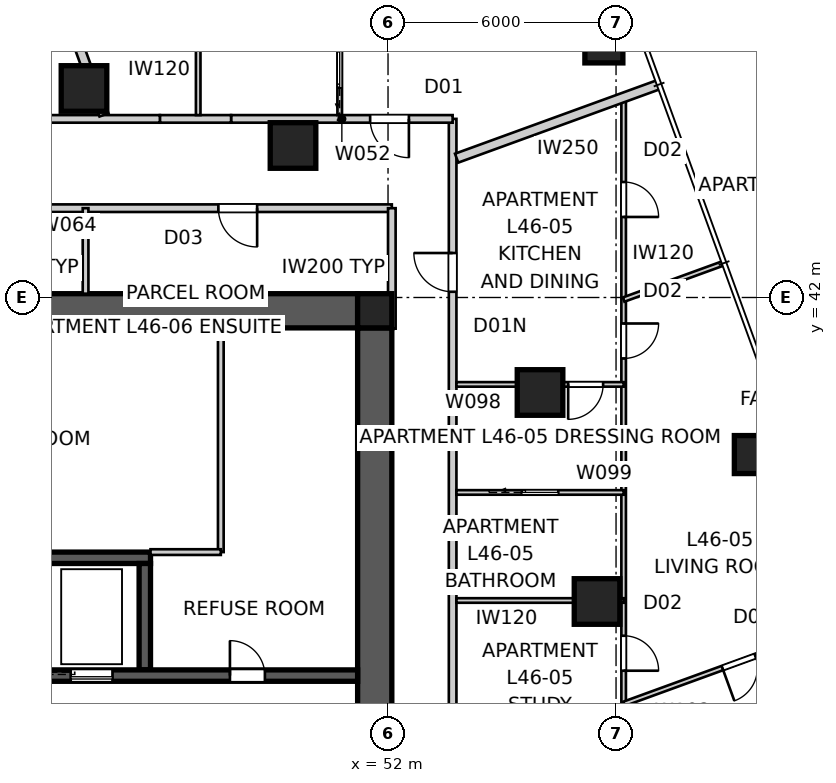
"""IFC4 building model, lengths in metres.
Left out: names, types, materials, properties, quantities, classifications, styles, units other than length and angle.
Written with IfcOpenShell. Run it as: python <this file> out.ifc"""

import sys

from ifc_helpers import new_model, si_unit, direction, frame, frame_2d, origin, origin_2d, place, context, subcontext, project, spatial, polyline, rectangle, outline, extrude, element, fill, save


model = new_model("IFC4")
c1 = context("Model", 3, precision=1e-05, world=origin(), true_north=direction((0.0, 1.0)))
c2 = subcontext(c1, "Body", "Model", "MODEL_VIEW")
j1 = project(units=[si_unit("LENGTHUNIT", "METRE"), si_unit("PLANEANGLEUNIT", "RADIAN")], contexts=[c1])
p1 = place(None, origin())
s1 = spatial("IfcSite", under=j1, at=p1, CompositionType="ELEMENT")
p2 = place(p1, origin())
s2 = spatial("IfcBuilding", under=s1, at=p2, CompositionType="ELEMENT")
p3 = place(p2, frame((0.0, 0.0, 167.6)))
s3 = spatial("IfcBuildingStorey", under=s2, at=p3, CompositionType="ELEMENT", Elevation=167.6)
p4 = place(p3, frame((28.8, 41.65, 0.0), z_axis=(0.0, 0.0, 1.0), x_axis=(1.0, 0.0, 0.0)))
e1 = element("IfcWall", 1, at=p4, inside=s3, PredefinedType="SHEAR", context=c2, shape_type="SweptSolid", body=[
    extrude(outline(polyline([(0.0, -0.45), (22.4, -0.45), (22.4, -0.025), (22.85, -0.025), (22.85, 0.025), (22.4, 0.025), (22.4, 0.45), (0.0, 0.45), (0.0, 0.025), (-0.45, 0.025), (-0.45, -0.025), (0.0, -0.025), (0.0, -0.45)])), origin(), (0.0, 0.0, 1.0), 3.4),
])
p5 = place(p3, frame((51.65, 18.8, 0.0), z_axis=(0.0, 0.0, 1.0), x_axis=(0.0, 1.0, 0.0)))
e2 = element("IfcWall", 2, at=p5, inside=s3, PredefinedType="SHEAR", context=c2, shape_type="SweptSolid", body=[
    extrude(outline(polyline([(0.0, -0.45), (22.4, -0.45), (22.4, -0.025), (22.85, -0.025), (22.85, 0.025), (22.4, 0.025), (22.4, 0.45), (0.0, 0.45), (0.0, 0.025), (-0.45, 0.025), (-0.45, -0.025), (0.0, -0.025), (0.0, -0.45)])), origin(), (0.0, 0.0, 1.0), 3.4),
])
p6 = place(p5, frame((11.14, 0.0, 0.0)))
e3 = element("IfcOpeningElement", 3, at=p6, cuts=e2, PredefinedType="OPENING", context=c2, shape_type="SweptSolid", body=[
    extrude(rectangle(XDim=1.02, YDim=2.4, at=frame_2d((0.51, 1.2))), frame((0.0, 0.46, 0.0), z_axis=(0.0, -1.0, 0.0), x_axis=(1.0, 0.0, 0.0)), (0.0, 0.0, 1.0), 0.92),
])
p7 = place(p3, frame((28.8, 32.05, 0.0), z_axis=(0.0, 0.0, 1.0), x_axis=(1.0, 0.0, 0.0)))
e4 = element("IfcWall", 4, at=p7, inside=s3, PredefinedType="SHEAR", context=c2, shape_type="SweptSolid", body=[
    extrude(rectangle(XDim=22.4, YDim=0.3, at=frame_2d((11.2, 0.0))), origin(), (0.0, 0.0, 1.0), 3.4),
])
p8 = place(p7, frame((19.04, 0.0, 0.0)))
e5 = element("IfcOpeningElement", 5, at=p8, cuts=e4, PredefinedType="OPENING", context=c2, shape_type="SweptSolid", body=[
    extrude(rectangle(XDim=0.92, YDim=2.1, at=frame_2d((0.46, 1.05))), frame((0.0, 0.16, 0.0), z_axis=(0.0, -1.0, 0.0), x_axis=(1.0, 0.0, 0.0)), (0.0, 0.0, 1.0), 0.32),
])
p9 = place(p7, frame((1.265, 0.0, 0.0)))
e6 = element("IfcOpeningElement", 6, at=p9, cuts=e4, PredefinedType="OPENING", context=c2, shape_type="SweptSolid", body=[
    extrude(rectangle(XDim=1.02, YDim=2.1, at=frame_2d((0.51, 1.05))), frame((0.0, 0.16, 0.0), z_axis=(0.0, -1.0, 0.0), x_axis=(1.0, 0.0, 0.0)), (0.0, 0.0, 1.0), 0.32),
])
p10 = place(p7, frame((4.015, 0.0, 0.0)))
e7 = element("IfcOpeningElement", 7, at=p10, cuts=e4, PredefinedType="OPENING", context=c2, shape_type="SweptSolid", body=[
    extrude(rectangle(XDim=0.92, YDim=2.1, at=frame_2d((0.46, 1.05))), frame((0.0, 0.16, 0.0), z_axis=(0.0, -1.0, 0.0), x_axis=(1.0, 0.0, 0.0)), (0.0, 0.0, 1.0), 0.32),
])
p11 = place(p7, frame((6.115, 0.0, 0.0)))
e8 = element("IfcOpeningElement", 8, at=p11, cuts=e4, PredefinedType="OPENING", context=c2, shape_type="SweptSolid", body=[
    extrude(rectangle(XDim=0.92, YDim=2.1, at=frame_2d((0.46, 1.05))), frame((0.0, 0.16, 0.0), z_axis=(0.0, -1.0, 0.0), x_axis=(1.0, 0.0, 0.0)), (0.0, 0.0, 1.0), 0.32),
])
p12 = place(p7, frame((9.79, 0.0, 0.0)))
e9 = element("IfcOpeningElement", 9, at=p12, cuts=e4, PredefinedType="OPENING", context=c2, shape_type="SweptSolid", body=[
    extrude(rectangle(XDim=0.92, YDim=2.1, at=frame_2d((0.46, 1.05))), frame((0.0, 0.16, 0.0), z_axis=(0.0, -1.0, 0.0), x_axis=(1.0, 0.0, 0.0)), (0.0, 0.0, 1.0), 0.32),
])
p13 = place(p7, frame((14.85, 0.0, 0.0)))
e10 = element("IfcOpeningElement", 10, at=p13, cuts=e4, PredefinedType="OPENING", context=c2, shape_type="SweptSolid", body=[
    extrude(rectangle(XDim=1.1, YDim=2.1, at=frame_2d((0.55, 1.05))), frame((0.0, 0.16, 0.0), z_axis=(0.0, -1.0, 0.0), x_axis=(1.0, 0.0, 0.0)), (0.0, 0.0, 1.0), 0.32),
])
p14 = place(p3, frame((34.25, 35.15, 0.0), z_axis=(0.0, 0.0, 1.0), x_axis=(1.0, 0.0, 0.0)))
e11 = element("IfcWall", 11, at=p14, inside=s3, PredefinedType="SHEAR", context=c2, shape_type="SweptSolid", body=[
    extrude(rectangle(XDim=11.5, YDim=0.3, at=frame_2d((5.75, 0.0))), origin(), (0.0, 0.0, 1.0), 3.4),
])
p15 = place(p3, frame((45.6, 32.2, 0.0), z_axis=(0.0, 0.0, 1.0), x_axis=(0.0, 1.0, 0.0)))
e12 = element("IfcWall", 12, at=p15, inside=s3, PredefinedType="SHEAR", context=c2, shape_type="SweptSolid", body=[
    extrude(rectangle(XDim=2.8, YDim=0.3, at=frame_2d((1.4, 0.0))), origin(), (0.0, 0.0, 1.0), 3.4),
])
p16 = place(p3, frame((51.65, 41.65, 0.0), z_axis=(0.0, 0.0, 1.0), x_axis=(1.0, 0.0, 0.0)))
e13 = element("IfcColumn", 13, at=p16, inside=s3, PredefinedType="COLUMN", context=c2, shape_type="SweptSolid", body=[
    extrude(rectangle(XDim=0.9, YDim=0.9, at=origin_2d()), origin(), (0.0, 0.0, 1.0), 3.4),
])
for number, where, z_axis, x_axis in (
    (14, (61.613, 37.866, 0.0), (0.0, 0.0, 1.0), (1.0, 0.0, 0.0)),
    (15, (57.68, 48.673, 0.0), (0.0, 0.0, 1.0), (1.0, 0.0, 0.0)),
):
    element("IfcColumn", number, at=place(p3, frame(where, z_axis=z_axis, x_axis=x_axis)), inside=s3, PredefinedType="COLUMN", context=c2, shape_type="SweptSolid", body=[
        extrude(rectangle(XDim=1.0, YDim=1.0, at=origin_2d()), origin(), (0.0, 0.0, 1.0), 3.2),
    ])
for number, where, z_axis, x_axis in (
    (16, (57.5, 34.0, 0.0), (0.0, 0.0, 1.0), (1.0, 0.0, 0.0)),
    (17, (56.0, 39.5, 0.0), (0.0, 0.0, 1.0), (1.0, 0.0, 0.0)),
    (18, (49.5, 46.0, 0.0), (0.0, 0.0, 1.0), (1.0, 0.0, 0.0)),
    (19, (44.0, 47.5, 0.0), (0.0, 0.0, 1.0), (1.0, 0.0, 0.0)),
):
    element("IfcColumn", number, at=place(p3, frame(where, z_axis=z_axis, x_axis=x_axis)), inside=s3, PredefinedType="COLUMN", context=c2, shape_type="SweptSolid", body=[
        extrude(rectangle(XDim=1.2, YDim=1.2, at=origin_2d()), origin(), (0.0, 0.0, 1.0), 3.4),
    ])
p17 = place(p3, frame((53.7, 12.9, 0.0), z_axis=(0.0, 0.0, 1.0), x_axis=(0.0, 1.0, 0.0)))
e20 = element("IfcWall", 20, at=p17, inside=s3, PredefinedType="PARTITIONING", context=c2, shape_type="SweptSolid", body=[
    extrude(rectangle(XDim=33.8, YDim=0.2, at=frame_2d((16.9, 0.0))), origin(), (0.0, 0.0, 1.0), 3.2),
])
p18 = place(p17, frame((29.25, 0.0, 0.0)))
e21 = element("IfcOpeningElement", 21, at=p18, cuts=e20, PredefinedType="OPENING", context=c2, shape_type="SweptSolid", body=[
    extrude(rectangle(XDim=1.02, YDim=2.0, at=frame_2d((0.51, 1.0))), frame((0.0, 0.11, 0.0), z_axis=(0.0, -1.0, 0.0), x_axis=(1.0, 0.0, 0.0)), (0.0, 0.0, 1.0), 0.22),
])
p19 = place(p17, frame((2.87, 0.0, 0.0)))
e22 = element("IfcOpeningElement", 22, at=p19, cuts=e20, PredefinedType="OPENING", context=c2, shape_type="SweptSolid", body=[
    extrude(rectangle(XDim=1.02, YDim=2.34, at=frame_2d((0.51, 1.17))), frame((0.0, 0.11, 0.0), z_axis=(0.0, -1.0, 0.0), x_axis=(1.0, 0.0, 0.0)), (0.0, 0.0, 1.0), 0.22),
])
p20 = place(p3, frame((53.7, 46.7, 0.0), z_axis=(0.0, 0.0, 1.0), x_axis=(-1.0, 0.0, 0.0)))
e23 = element("IfcWall", 23, at=p20, inside=s3, PredefinedType="PARTITIONING", context=c2, shape_type="SweptSolid", body=[
    extrude(rectangle(XDim=5.83, YDim=0.2, at=frame_2d((2.915, 0.0))), origin(), (0.0, 0.0, 1.0), 3.2),
])
p21 = place(p20, frame((1.151, 0.0, 0.0)))
e24 = element("IfcOpeningElement", 24, at=p21, cuts=e23, PredefinedType="OPENING", context=c2, shape_type="SweptSolid", body=[
    extrude(rectangle(XDim=1.02, YDim=2.34, at=frame_2d((0.51, 1.17))), frame((0.0, 0.11, 0.0), z_axis=(0.0, -1.0, 0.0), x_axis=(1.0, 0.0, 0.0)), (0.0, 0.0, 1.0), 0.22),
])
p22 = place(p3, frame((47.87, 46.7, 0.0), z_axis=(0.0, 0.0, 1.0), x_axis=(-1.0, 0.0, 0.0)))
e25 = element("IfcWall", 25, at=p22, inside=s3, PredefinedType="PARTITIONING", context=c2, shape_type="SweptSolid", body=[
    extrude(rectangle(XDim=1.874, YDim=0.2, at=frame_2d((0.937, 0.0))), origin(), (0.0, 0.0, 1.0), 2.2),
])
p23 = place(p3, frame((45.997, 46.7, 0.0), z_axis=(0.0, 0.0, 1.0), x_axis=(-1.0, 0.0, 0.0)))
e26 = element("IfcWall", 26, at=p23, inside=s3, PredefinedType="PARTITIONING", context=c2, shape_type="SweptSolid", body=[
    extrude(rectangle(XDim=11.993, YDim=0.2, at=frame_2d((5.997, 0.0))), origin(), (0.0, 0.0, 1.0), 3.2),
])
p24 = place(p3, frame((59.132, 47.605, 0.0), z_axis=(0.0, 0.0, 1.0), x_axis=(-0.939690274876, -0.342026588591, 0.0)))
e27 = element("IfcWall", 27, at=p24, inside=s3, PredefinedType="PARTITIONING", context=c2, shape_type="SweptSolid", body=[
    extrude(rectangle(XDim=5.669, YDim=0.25, at=frame_2d((2.834, 0.0))), origin(), (0.0, 0.0, 1.0), 3.2),
])
p25 = place(p3, frame((43.717, 49.026, 0.0), z_axis=(0.0, 0.0, 1.0), x_axis=(0.342049950026, -0.939681771499, 0.0)))
e28 = element("IfcWall", 28, at=p25, inside=s3, PredefinedType="PARTITIONING", context=c2, shape_type="SweptSolid", body=[
    extrude(rectangle(XDim=2.363, YDim=0.25, at=frame_2d((1.182, 0.0))), origin(), (0.0, 0.0, 1.0), 3.2),
])
p26 = place(p3, frame((47.6, 41.2, 0.0), z_axis=(0.0, 0.0, 1.0), x_axis=(0.0, -1.0, 0.0)))
e29 = element("IfcWall", 29, at=p26, inside=s3, PredefinedType="SOLIDWALL", context=c2, shape_type="SweptSolid", body=[
    extrude(rectangle(XDim=5.9, YDim=0.15, at=frame_2d((2.95, 0.0))), origin(), (0.0, 0.0, 1.0), 3.2),
])
p27 = place(p3, frame((47.6, 35.3, 0.0), z_axis=(0.0, 0.0, 1.0), x_axis=(-1.0, 0.0, 0.0)))
e30 = element("IfcWall", 30, at=p27, inside=s3, PredefinedType="SOLIDWALL", context=c2, shape_type="SweptSolid", body=[
    extrude(rectangle(XDim=1.85, YDim=0.15, at=frame_2d((0.925, 0.0))), origin(), (0.0, 0.0, 1.0), 3.2),
])
p28 = place(p3, frame((52.1, 44.35, 0.0), z_axis=(0.0, 0.0, 1.0), x_axis=(-1.0, 0.0, 0.0)))
e31 = element("IfcWall", 31, at=p28, inside=s3, PredefinedType="PARTITIONING", context=c2, shape_type="SweptSolid", body=[
    extrude(rectangle(XDim=24.2, YDim=0.2, at=frame_2d((12.1, 0.0))), origin(), (0.0, 0.0, 1.0), 3.2),
])
p29 = place(p28, frame((12.437, 0.0, 0.0)))
e32 = element("IfcOpeningElement", 32, at=p29, cuts=e31, PredefinedType="OPENING", context=c2, shape_type="SweptSolid", body=[
    extrude(rectangle(XDim=1.02, YDim=2.1, at=frame_2d((0.51, 1.05))), frame((0.0, 0.11, 0.0), z_axis=(0.0, -1.0, 0.0), x_axis=(1.0, 0.0, 0.0)), (0.0, 0.0, 1.0), 0.22),
])
p30 = place(p28, frame((3.544, 0.0, 0.0)))
e33 = element("IfcOpeningElement", 33, at=p30, cuts=e31, PredefinedType="OPENING", context=c2, shape_type="SweptSolid", body=[
    extrude(rectangle(XDim=1.02, YDim=2.1, at=frame_2d((0.51, 1.05))), frame((0.0, 0.11, 0.0), z_axis=(0.0, -1.0, 0.0), x_axis=(1.0, 0.0, 0.0)), (0.0, 0.0, 1.0), 0.22),
])
p31 = place(p28, frame((19.883, 0.0, 0.0)))
e34 = element("IfcOpeningElement", 34, at=p31, cuts=e31, PredefinedType="OPENING", context=c2, shape_type="SweptSolid", body=[
    extrude(rectangle(XDim=1.02, YDim=2.1, at=frame_2d((0.51, 1.05))), frame((0.0, 0.11, 0.0), z_axis=(0.0, -1.0, 0.0), x_axis=(1.0, 0.0, 0.0)), (0.0, 0.0, 1.0), 0.22),
])
p32 = place(p3, frame((52.1, 41.18, 0.0), z_axis=(0.0, 0.0, 1.0), x_axis=(0.0, 1.0, 0.0)))
e35 = element("IfcWall", 35, at=p32, inside=s3, PredefinedType="PARTITIONING", context=c2, shape_type="SweptSolid", body=[
    extrude(rectangle(XDim=3.17, YDim=0.2, at=frame_2d((1.585, 0.0))), origin(), (0.0, 0.0, 1.0), 3.2),
])
p33 = place(p3, frame((44.042, 42.1, 0.0), z_axis=(0.0, 0.0, 1.0), x_axis=(0.0, 1.0, 0.0)))
e36 = element("IfcWall", 36, at=p33, inside=s3, PredefinedType="SOLIDWALL", context=c2, shape_type="SweptSolid", body=[
    extrude(rectangle(XDim=2.25, YDim=0.15, at=frame_2d((1.125, 0.0))), origin(), (0.0, 0.0, 1.0), 3.2),
])
p34 = place(p3, frame((58.2, 47.266, 0.0), z_axis=(0.0, 0.0, 1.0), x_axis=(0.0, -1.0, 0.0)))
e37 = element("IfcWall", 37, at=p34, inside=s3, PredefinedType="PARTITIONING", context=c2, shape_type="SweptSolid", body=[
    extrude(rectangle(XDim=36.14, YDim=0.12, at=frame_2d((18.07, 0.0))), origin(), (0.0, 0.0, 1.0), 3.2),
])
p35 = place(p34, frame((2.227, 0.0, 0.0)))
e38 = element("IfcOpeningElement", 38, at=p35, cuts=e37, PredefinedType="OPENING", context=c2, shape_type="SweptSolid", body=[
    extrude(rectangle(XDim=0.92, YDim=2.34, at=frame_2d((0.46, 1.17))), frame((0.0, 0.07, 0.0), z_axis=(0.0, -1.0, 0.0), x_axis=(1.0, 0.0, 0.0)), (0.0, 0.0, 1.0), 0.14),
])
p36 = place(p34, frame((5.95, 0.0, 0.0)))
e39 = element("IfcOpeningElement", 39, at=p36, cuts=e37, PredefinedType="OPENING", context=c2, shape_type="SweptSolid", body=[
    extrude(rectangle(XDim=0.92, YDim=2.34, at=frame_2d((0.46, 1.17))), frame((0.0, 0.07, 0.0), z_axis=(0.0, -1.0, 0.0), x_axis=(1.0, 0.0, 0.0)), (0.0, 0.0, 1.0), 0.14),
])
p37 = place(p34, frame((29.769, 0.0, 0.0)))
e40 = element("IfcOpeningElement", 40, at=p37, cuts=e37, PredefinedType="OPENING", context=c2, shape_type="SweptSolid", body=[
    extrude(rectangle(XDim=0.92, YDim=2.34, at=frame_2d((0.46, 1.17))), frame((0.0, 0.07, 0.0), z_axis=(0.0, -1.0, 0.0), x_axis=(1.0, 0.0, 0.0)), (0.0, 0.0, 1.0), 0.14),
])
p38 = place(p34, frame((14.168, 0.0, 0.0)))
e41 = element("IfcOpeningElement", 41, at=p38, cuts=e37, PredefinedType="OPENING", context=c2, shape_type="SweptSolid", body=[
    extrude(rectangle(XDim=0.92, YDim=2.34, at=frame_2d((0.46, 1.17))), frame((0.0, 0.07, 0.0), z_axis=(0.0, -1.0, 0.0), x_axis=(1.0, 0.0, 0.0)), (0.0, 0.0, 1.0), 0.14),
])
p39 = place(p34, frame((33.434, 0.0, 0.0)))
e42 = element("IfcOpeningElement", 42, at=p39, cuts=e37, PredefinedType="OPENING", context=c2, shape_type="SweptSolid", body=[
    extrude(rectangle(XDim=0.92, YDim=2.34, at=frame_2d((0.46, 1.17))), frame((0.0, 0.07, 0.0), z_axis=(0.0, -1.0, 0.0), x_axis=(1.0, 0.0, 0.0)), (0.0, 0.0, 1.0), 0.14),
])
p40 = place(p3, frame((58.2, 39.713, 0.0), z_axis=(0.0, 0.0, 1.0), x_axis=(-1.0, 0.0, 0.0)))
e43 = element("IfcWall", 43, at=p40, inside=s3, PredefinedType="PARTITIONING", context=c2, shape_type="SweptSolid", body=[
    extrude(rectangle(XDim=4.4, YDim=0.12, at=frame_2d((2.2, 0.0))), origin(), (0.0, 0.0, 1.0), 3.2),
])
p41 = place(p40, frame((0.54, 0.0, 0.0)))
e44 = element("IfcOpeningElement", 44, at=p41, cuts=e43, PredefinedType="OPENING", context=c2, shape_type="SweptSolid", body=[
    extrude(rectangle(XDim=0.92, YDim=2.34, at=frame_2d((0.46, 1.17))), frame((0.0, 0.07, 0.0), z_axis=(0.0, -1.0, 0.0), x_axis=(1.0, 0.0, 0.0)), (0.0, 0.0, 1.0), 0.14),
])
p42 = place(p3, frame((53.8, 36.87, 0.0), z_axis=(0.0, 0.0, 1.0), x_axis=(1.0, 0.0, 0.0)))
e45 = element("IfcWall", 45, at=p42, inside=s3, PredefinedType="PARTITIONING", context=c2, shape_type="SweptSolid", body=[
    extrude(rectangle(XDim=4.4, YDim=0.12, at=frame_2d((2.2, 0.0))), origin(), (0.0, 0.0, 1.0), 3.2),
])
p43 = place(p42, frame((1.72, 0.0, 0.0)))
e46 = element("IfcOpeningElement", 46, at=p43, cuts=e45, PredefinedType="OPENING", context=c2, shape_type="SweptSolid", body=[
    extrude(rectangle(XDim=0.96, YDim=2.1, at=frame_2d((0.48, 1.05))), frame((0.0, 0.07, 0.0), z_axis=(0.0, -1.0, 0.0), x_axis=(1.0, 0.0, 0.0)), (0.0, 0.0, 1.0), 0.14),
])
p44 = place(p3, frame((58.2, 34.027, 0.0), z_axis=(0.0, 0.0, 1.0), x_axis=(-1.0, 0.0, 0.0)))
e47 = element("IfcWall", 47, at=p44, inside=s3, PredefinedType="PARTITIONING", context=c2, shape_type="SweptSolid", body=[
    extrude(rectangle(XDim=4.4, YDim=0.12, at=frame_2d((2.2, 0.0))), origin(), (0.0, 0.0, 1.0), 3.2),
])
p45 = place(p3, frame((64.225, 33.496, 0.0), z_axis=(0.0, 0.0, 1.0), x_axis=(-0.939697777766, -0.342005974306, 0.0)))
e48 = element("IfcWall", 48, at=p45, inside=s3, PredefinedType="PARTITIONING", context=c2, shape_type="SweptSolid", body=[
    extrude(rectangle(XDim=6.412, YDim=0.12, at=frame_2d((3.206, 0.0))), origin(), (0.0, 0.0, 1.0), 3.2),
])
p46 = place(p45, frame((2.726, 0.0, 0.0)))
e49 = element("IfcOpeningElement", 49, at=p46, cuts=e48, PredefinedType="OPENING", context=c2, shape_type="SweptSolid", body=[
    extrude(rectangle(XDim=0.92, YDim=2.34, at=frame_2d((0.46, 1.17))), frame((0.0, 0.07, 0.0), z_axis=(0.0, -1.0, 0.0), x_axis=(1.0, 0.0, 0.0)), (0.0, 0.0, 1.0), 0.14),
])
p47 = place(p3, frame((58.2, 41.945, 0.0), z_axis=(0.0, 0.0, 1.0), x_axis=(0.939680234176, 0.34205417334, 0.0)))
e50 = element("IfcWall", 50, at=p47, inside=s3, PredefinedType="PARTITIONING", context=c2, shape_type="SweptSolid", body=[
    extrude(rectangle(XDim=2.772, YDim=0.12, at=frame_2d((1.386, 0.0))), origin(), (0.0, 0.0, 1.0), 3.2),
])
p48 = place(p3, frame((50.729, 46.8, 0.0), z_axis=(0.0, 0.0, 1.0), x_axis=(0.0, 1.0, 0.0)))
e51 = element("IfcWall", 51, at=p48, inside=s3, PredefinedType="PARTITIONING", context=c2, shape_type="SweptSolid", body=[
    extrude(rectangle(XDim=2.4, YDim=0.12, at=frame_2d((1.2, 0.0))), origin(), (0.0, 0.0, 1.0), 3.2),
])
p49 = place(p48, frame((0.72, 0.0, 0.0)))
e52 = element("IfcOpeningElement", 52, at=p49, cuts=e51, PredefinedType="OPENING", context=c2, shape_type="SweptSolid", body=[
    extrude(rectangle(XDim=0.96, YDim=2.1, at=frame_2d((0.48, 1.05))), frame((0.0, 0.07, 0.0), z_axis=(0.0, -1.0, 0.0), x_axis=(1.0, 0.0, 0.0)), (0.0, 0.0, 1.0), 0.14),
])
p50 = place(p3, frame((47.005, 46.8, 0.0), z_axis=(0.0, 0.0, 1.0), x_axis=(0.0, 1.0, 0.0)))
e53 = element("IfcWall", 53, at=p50, inside=s3, PredefinedType="PARTITIONING", context=c2, shape_type="SweptSolid", body=[
    extrude(rectangle(XDim=2.4, YDim=0.12, at=frame_2d((1.2, 0.0))), origin(), (0.0, 0.0, 1.0), 3.2),
])
p51 = place(p8, origin())
e54 = element("IfcDoor", 54, at=p51, inside=s3, OperationType="SINGLE_SWING_LEFT", PredefinedType="DOOR", context=c2, shape_type="SweptSolid", body=[
    extrude(rectangle(XDim=0.92, YDim=2.1, at=frame_2d((0.46, 1.05))), frame((0.0, 0.025, 0.0), z_axis=(0.0, -1.0, 0.0), x_axis=(1.0, 0.0, 0.0)), (0.0, 0.0, 1.0), 0.05),
])
fill(e5, e54)
p52 = place(p30, origin())
e55 = element("IfcDoor", 55, at=p52, inside=s3, OperationType="SINGLE_SWING_LEFT", PredefinedType="DOOR", context=c2, shape_type="SweptSolid", body=[
    extrude(rectangle(XDim=1.02, YDim=2.1, at=frame_2d((0.51, 1.05))), frame((0.0, 0.025, 0.0), z_axis=(0.0, -1.0, 0.0), x_axis=(1.0, 0.0, 0.0)), (0.0, 0.0, 1.0), 0.05),
])
fill(e33, e55)
p53 = place(p18, origin())
e56 = element("IfcDoor", 56, at=p53, inside=s3, OperationType="SINGLE_SWING_RIGHT", PredefinedType="DOOR", context=c2, shape_type="SweptSolid", body=[
    extrude(rectangle(XDim=1.02, YDim=2.0, at=frame_2d((0.51, 1.0))), frame((0.0, 0.025, 0.0), z_axis=(0.0, -1.0, 0.0), x_axis=(1.0, 0.0, 0.0)), (0.0, 0.0, 1.0), 0.05),
])
fill(e21, e56)
p54 = place(p21, origin())
e57 = element("IfcDoor", 57, at=p54, inside=s3, OperationType="SINGLE_SWING_LEFT", PredefinedType="DOOR", context=c2, shape_type="SweptSolid", body=[
    extrude(rectangle(XDim=1.02, YDim=2.34, at=frame_2d((0.51, 1.17))), frame((0.0, 0.025, 0.0), z_axis=(0.0, -1.0, 0.0), x_axis=(1.0, 0.0, 0.0)), (0.0, 0.0, 1.0), 0.05),
])
fill(e24, e57)
p55 = place(p35, origin())
e58 = element("IfcDoor", 58, at=p55, inside=s3, OperationType="SINGLE_SWING_RIGHT", PredefinedType="DOOR", context=c2, shape_type="SweptSolid", body=[
    extrude(rectangle(XDim=0.92, YDim=2.34, at=frame_2d((0.46, 1.17))), frame((0.0, 0.025, 0.0), z_axis=(0.0, -1.0, 0.0), x_axis=(1.0, 0.0, 0.0)), (0.0, 0.0, 1.0), 0.05),
])
fill(e38, e58)
p56 = place(p41, origin())
e59 = element("IfcDoor", 59, at=p56, inside=s3, OperationType="SINGLE_SWING_RIGHT", PredefinedType="DOOR", context=c2, shape_type="SweptSolid", body=[
    extrude(rectangle(XDim=0.92, YDim=2.34, at=frame_2d((0.46, 1.17))), frame((0.0, 0.025, 0.0), z_axis=(0.0, -1.0, 0.0), x_axis=(1.0, 0.0, 0.0)), (0.0, 0.0, 1.0), 0.05),
])
fill(e44, e59)
p57 = place(p36, origin())
e60 = element("IfcDoor", 60, at=p57, inside=s3, OperationType="SINGLE_SWING_LEFT", PredefinedType="DOOR", context=c2, shape_type="SweptSolid", body=[
    extrude(rectangle(XDim=0.92, YDim=2.34, at=frame_2d((0.46, 1.17))), frame((0.0, 0.025, 0.0), z_axis=(0.0, -1.0, 0.0), x_axis=(1.0, 0.0, 0.0)), (0.0, 0.0, 1.0), 0.05),
])
fill(e39, e60)
p58 = place(p49, origin())
e61 = element("IfcDoor", 61, at=p58, inside=s3, OperationType="SLIDING_TO_LEFT", PredefinedType="DOOR", context=c2, shape_type="SweptSolid", body=[
    extrude(rectangle(XDim=0.96, YDim=2.1, at=frame_2d((0.48, 1.05))), frame((0.0, 0.025, 0.0), z_axis=(0.0, -1.0, 0.0), x_axis=(1.0, 0.0, 0.0)), (0.0, 0.0, 1.0), 0.05),
])
fill(e52, e61)
p59 = place(p43, origin())
e62 = element("IfcDoor", 62, at=p59, inside=s3, OperationType="SLIDING_TO_LEFT", PredefinedType="DOOR", context=c2, shape_type="SweptSolid", body=[
    extrude(rectangle(XDim=0.96, YDim=2.1, at=frame_2d((0.48, 1.05))), frame((0.0, 0.025, 0.0), z_axis=(0.0, -1.0, 0.0), x_axis=(1.0, 0.0, 0.0)), (0.0, 0.0, 1.0), 0.05),
])
fill(e46, e62)
p60 = place(p46, origin())
e63 = element("IfcDoor", 63, at=p60, inside=s3, OperationType="SINGLE_SWING_RIGHT", PredefinedType="DOOR", context=c2, shape_type="SweptSolid", body=[
    extrude(rectangle(XDim=0.92, YDim=2.34, at=frame_2d((0.46, 1.17))), frame((0.0, 0.025, 0.0), z_axis=(0.0, -1.0, 0.0), x_axis=(1.0, 0.0, 0.0)), (0.0, 0.0, 1.0), 0.05),
])
fill(e49, e63)
p61 = place(p38, origin())
e64 = element("IfcDoor", 64, at=p61, inside=s3, OperationType="SINGLE_SWING_RIGHT", PredefinedType="DOOR", context=c2, shape_type="SweptSolid", body=[
    extrude(rectangle(XDim=0.92, YDim=2.34, at=frame_2d((0.46, 1.17))), frame((0.0, 0.025, 0.0), z_axis=(0.0, -1.0, 0.0), x_axis=(1.0, 0.0, 0.0)), (0.0, 0.0, 1.0), 0.05),
])
fill(e41, e64)
p62 = place(p13, origin())
e65 = element("IfcDoor", 65, at=p62, inside=s3, OperationType="SLIDING_TO_LEFT", PredefinedType="DOOR", context=c2, shape_type="SweptSolid", body=[
    extrude(rectangle(XDim=1.1, YDim=2.1, at=frame_2d((0.55, 1.05))), frame((0.0, 0.025, 0.0), z_axis=(0.0, -1.0, 0.0), x_axis=(1.0, 0.0, 0.0)), (0.0, 0.0, 1.0), 0.05),
])
fill(e10, e65)
save(model, sys.argv[1])
